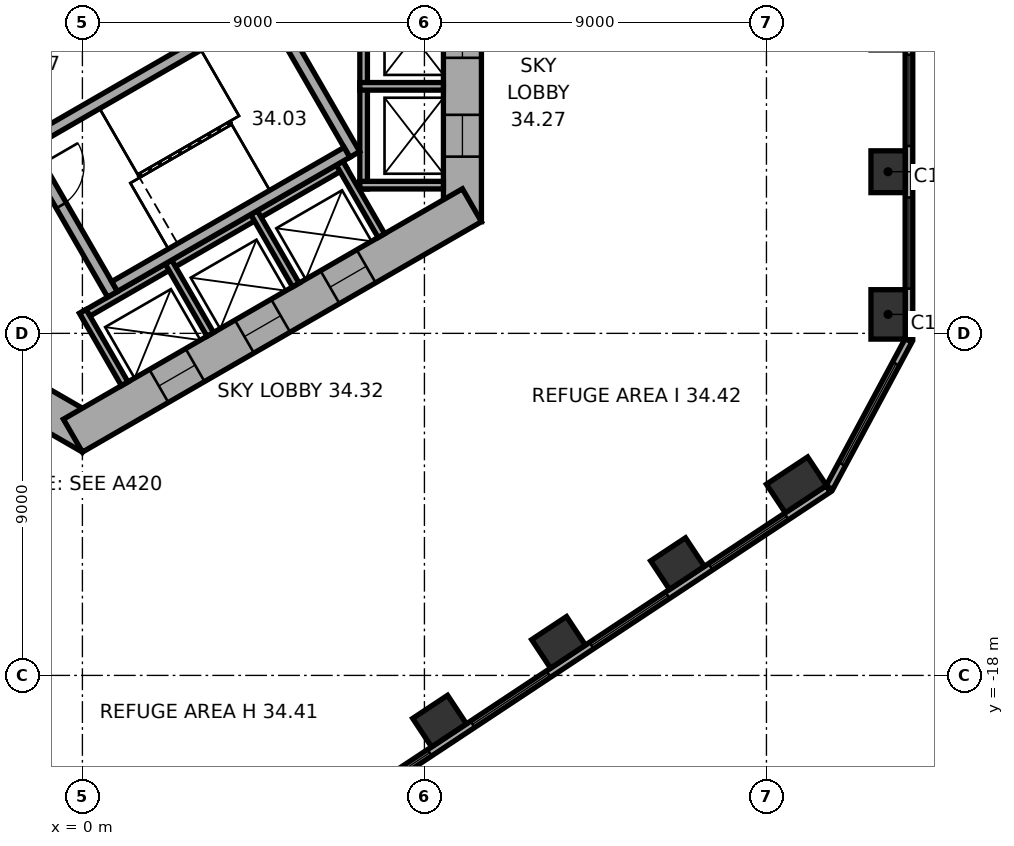
"""IFC4 building model, lengths in metres.
Left out: names, types, materials, properties, quantities, classifications, styles, units other than length and angle.
Written with IfcOpenShell. Run it as: python <this file> out.ifc"""

import sys

from ifc_helpers import new_model, si_unit, direction, frame, frame_2d, origin, origin_2d, place, context, subcontext, project, spatial, rectangle, extrude, element, fill, save


model = new_model("IFC4")
c1 = context("Model", 3, precision=1e-05, world=origin(), true_north=direction((0.0, 1.0)))
c2 = subcontext(c1, "Body", "Model", "MODEL_VIEW")
j1 = project(units=[si_unit("LENGTHUNIT", "METRE"), si_unit("PLANEANGLEUNIT", "RADIAN")], contexts=[c1])
p1 = place(None, origin())
s1 = spatial("IfcSite", under=j1, at=p1, CompositionType="ELEMENT")
p2 = place(p1, origin())
s2 = spatial("IfcBuilding", under=s1, at=p2, CompositionType="ELEMENT")
p3 = place(p2, frame((0.0, 0.0, 139.2)))
s3 = spatial("IfcBuildingStorey", under=s2, at=p3, CompositionType="ELEMENT", Elevation=139.2)
p4 = place(p3, frame((21.2, -8.501, 0.0), z_axis=(0.0, 0.0, 1.0), x_axis=(0.0, 1.0, 0.0)))
e1 = element("IfcColumn", 1, at=p4, inside=s3, PredefinedType="COLUMN", context=c2, shape_type="SweptSolid", body=[
    extrude(rectangle(XDim=1.3, YDim=0.9, at=origin_2d()), origin(), (0.0, 0.0, 1.0), 7.4),
])
for number, where, z_axis, x_axis in (
    (2, (21.2, -4.747, 0.0), (0.0, 0.0, 1.0), (0.0, 1.0, 0.0)),
    (3, (9.398, -19.202, 0.0), (0.0, 0.0, 1.0), (0.834, 0.552, 0.0)),
    (4, (12.529, -17.13, 0.0), (0.0, 0.0, 1.0), (0.834, 0.552, 0.0)),
    (5, (15.659, -15.058, 0.0), (0.0, 0.0, 1.0), (0.834, 0.552, 0.0)),
):
    element("IfcColumn", number, at=place(p3, frame(where, z_axis=z_axis, x_axis=x_axis)), inside=s3, PredefinedType="COLUMN", context=c2, shape_type="SweptSolid", body=[
        extrude(rectangle(XDim=1.1, YDim=0.9, at=origin_2d()), origin(), (0.0, 0.0, 1.0), 7.4),
    ])
p5 = place(p3, frame((18.79, -12.986, 0.0), z_axis=(0.0, 0.0, 1.0), x_axis=(0.833885822067, 0.551936985312, 0.0)))
e6 = element("IfcColumn", 6, at=p5, inside=s3, PredefinedType="COLUMN", context=c2, shape_type="SweptSolid", body=[
    extrude(rectangle(XDim=1.3, YDim=0.9, at=origin_2d()), origin(), (0.0, 0.0, 1.0), 7.4),
])
p6 = place(p3, frame((10.0, -6.062, 0.0), z_axis=(0.0, 0.0, 1.0), x_axis=(0.0, 1.0, 0.0)))
e7 = element("IfcWall", 7, at=p6, inside=s3, PredefinedType="SHEAR", context=c2, shape_type="SweptSolid", body=[
    extrude(rectangle(XDim=12.125, YDim=1.0, at=frame_2d((6.062, 0.0))), origin(), (0.0, 0.0, 1.0), 7.4),
])
p7 = place(p6, frame((6.262, 0.0, 0.0)))
e8 = element("IfcOpeningElement", 8, at=p7, cuts=e7, PredefinedType="OPENING", context=c2, shape_type="SweptSolid", body=[
    extrude(rectangle(XDim=1.5, YDim=2.1, at=frame_2d((0.75, 1.05))), frame((0.0, 0.51, 0.0), z_axis=(0.0, -1.0, 0.0), x_axis=(1.0, 0.0, 0.0)), (0.0, 0.0, 1.0), 1.02),
])
p8 = place(p6, frame((1.712, 0.0, 0.0)))
e9 = element("IfcOpeningElement", 9, at=p8, cuts=e7, PredefinedType="OPENING", context=c2, shape_type="SweptSolid", body=[
    extrude(rectangle(XDim=1.1, YDim=2.1, at=frame_2d((0.55, 1.05))), frame((0.0, 0.51, 0.0), z_axis=(0.0, -1.0, 0.0), x_axis=(1.0, 0.0, 0.0)), (0.0, 0.0, 1.0), 1.02),
])
p9 = place(p6, frame((4.312, 0.0, 0.0)))
e10 = element("IfcOpeningElement", 10, at=p9, cuts=e7, PredefinedType="OPENING", context=c2, shape_type="SweptSolid", body=[
    extrude(rectangle(XDim=1.1, YDim=2.1, at=frame_2d((0.55, 1.05))), frame((0.0, 0.51, 0.0), z_axis=(0.0, -1.0, 0.0), x_axis=(1.0, 0.0, 0.0)), (0.0, 0.0, 1.0), 1.02),
])
p10 = place(p3, frame((-10.25, -5.629, 0.0), z_axis=(0.0, 0.0, 1.0), x_axis=(0.866022616891, -0.50000482701, 0.0)))
e11 = element("IfcWall", 11, at=p10, inside=s3, PredefinedType="SHEAR", context=c2, shape_type="SweptSolid", body=[
    extrude(rectangle(XDim=12.125, YDim=1.0, at=frame_2d((6.062, 0.0))), origin(), (0.0, 0.0, 1.0), 7.4),
])
p11 = place(p10, frame((6.262, 0.0, 0.0)))
e12 = element("IfcOpeningElement", 12, at=p11, cuts=e11, PredefinedType="OPENING", context=c2, shape_type="SweptSolid", body=[
    extrude(rectangle(XDim=1.5, YDim=2.1, at=frame_2d((0.75, 1.05))), frame((0.0, 0.51, 0.0), z_axis=(0.0, -1.0, 0.0), x_axis=(1.0, 0.0, 0.0)), (0.0, 0.0, 1.0), 1.02),
])
p12 = place(p10, frame((1.712, 0.0, 0.0)))
e13 = element("IfcOpeningElement", 13, at=p12, cuts=e11, PredefinedType="OPENING", context=c2, shape_type="SweptSolid", body=[
    extrude(rectangle(XDim=1.1, YDim=2.1, at=frame_2d((0.55, 1.05))), frame((0.0, 0.51, 0.0), z_axis=(0.0, -1.0, 0.0), x_axis=(1.0, 0.0, 0.0)), (0.0, 0.0, 1.0), 1.02),
])
p13 = place(p10, frame((4.312, 0.0, 0.0)))
e14 = element("IfcOpeningElement", 14, at=p13, cuts=e11, PredefinedType="OPENING", context=c2, shape_type="SweptSolid", body=[
    extrude(rectangle(XDim=1.1, YDim=2.1, at=frame_2d((0.55, 1.05))), frame((0.0, 0.51, 0.0), z_axis=(0.0, -1.0, 0.0), x_axis=(1.0, 0.0, 0.0)), (0.0, 0.0, 1.0), 1.02),
])
p14 = place(p3, frame((-0.25, -11.691, 0.0), z_axis=(0.0, 0.0, 1.0), x_axis=(0.866022616891, 0.50000482701, 0.0)))
e15 = element("IfcWall", 15, at=p14, inside=s3, PredefinedType="SHEAR", context=c2, shape_type="SweptSolid", body=[
    extrude(rectangle(XDim=12.125, YDim=1.0, at=frame_2d((6.062, 0.0))), origin(), (0.0, 0.0, 1.0), 7.4),
])
p15 = place(p14, frame((2.612, 0.0, 0.0)))
e16 = element("IfcOpeningElement", 16, at=p15, cuts=e15, PredefinedType="OPENING", context=c2, shape_type="SweptSolid", body=[
    extrude(rectangle(XDim=1.1, YDim=2.1, at=frame_2d((0.55, 1.05))), frame((0.0, 0.51, 0.0), z_axis=(0.0, -1.0, 0.0), x_axis=(1.0, 0.0, 0.0)), (0.0, 0.0, 1.0), 1.02),
])
p16 = place(p14, frame((5.212, 0.0, 0.0)))
e17 = element("IfcOpeningElement", 17, at=p16, cuts=e15, PredefinedType="OPENING", context=c2, shape_type="SweptSolid", body=[
    extrude(rectangle(XDim=1.1, YDim=2.1, at=frame_2d((0.55, 1.05))), frame((0.0, 0.51, 0.0), z_axis=(0.0, -1.0, 0.0), x_axis=(1.0, 0.0, 0.0)), (0.0, 0.0, 1.0), 1.02),
])
p17 = place(p14, frame((7.812, 0.0, 0.0)))
e18 = element("IfcOpeningElement", 18, at=p17, cuts=e15, PredefinedType="OPENING", context=c2, shape_type="SweptSolid", body=[
    extrude(rectangle(XDim=1.1, YDim=2.1, at=frame_2d((0.55, 1.05))), frame((0.0, 0.51, 0.0), z_axis=(0.0, -1.0, 0.0), x_axis=(1.0, 0.0, 0.0)), (0.0, 0.0, 1.0), 1.02),
])
p18 = place(p3, frame((21.75, -9.138, 0.0), z_axis=(0.0, 0.0, 1.0), x_axis=(0.0, 1.0, 0.0)))
e19 = element("IfcWall", 19, at=p18, inside=s3, PredefinedType="STANDARD", context=c2, shape_type="SweptSolid", body=[
    extrude(rectangle(XDim=20.044, YDim=0.2, at=frame_2d((10.022, 0.0))), origin(), (0.0, 0.0, 1.0), 7.4),
])
p19 = place(p18, frame((1.314, 0.0, 0.8)))
e20 = element("IfcOpeningElement", 20, at=p19, cuts=e19, PredefinedType="OPENING", context=c2, shape_type="SweptSolid", body=[
    extrude(rectangle(XDim=2.4, YDim=4.2, at=frame_2d((1.2, 2.1))), frame((0.0, 0.11, 0.0), z_axis=(0.0, -1.0, 0.0), x_axis=(1.0, 0.0, 0.0)), (0.0, 0.0, 1.0), 0.22),
])
p20 = place(p18, frame((5.069, 0.0, 0.8)))
e21 = element("IfcOpeningElement", 21, at=p20, cuts=e19, PredefinedType="OPENING", context=c2, shape_type="SweptSolid", body=[
    extrude(rectangle(XDim=2.4, YDim=4.2, at=frame_2d((1.2, 2.1))), frame((0.0, 0.11, 0.0), z_axis=(0.0, -1.0, 0.0), x_axis=(1.0, 0.0, 0.0)), (0.0, 0.0, 1.0), 0.22),
])
p21 = place(p18, frame((8.823, 0.0, 0.8)))
e22 = element("IfcOpeningElement", 22, at=p21, cuts=e19, PredefinedType="OPENING", context=c2, shape_type="SweptSolid", body=[
    extrude(rectangle(XDim=2.4, YDim=4.2, at=frame_2d((1.2, 2.1))), frame((0.0, 0.11, 0.0), z_axis=(0.0, -1.0, 0.0), x_axis=(1.0, 0.0, 0.0)), (0.0, 0.0, 1.0), 0.22),
])
p22 = place(p18, frame((12.577, 0.0, 0.8)))
e23 = element("IfcOpeningElement", 23, at=p22, cuts=e19, PredefinedType="OPENING", context=c2, shape_type="SweptSolid", body=[
    extrude(rectangle(XDim=2.4, YDim=4.2, at=frame_2d((1.2, 2.1))), frame((0.0, 0.11, 0.0), z_axis=(0.0, -1.0, 0.0), x_axis=(1.0, 0.0, 0.0)), (0.0, 0.0, 1.0), 0.22),
])
p23 = place(p18, frame((16.331, 0.0, 0.8)))
e24 = element("IfcOpeningElement", 24, at=p23, cuts=e19, PredefinedType="OPENING", context=c2, shape_type="SweptSolid", body=[
    extrude(rectangle(XDim=2.4, YDim=4.2, at=frame_2d((1.2, 2.1))), frame((0.0, 0.11, 0.0), z_axis=(0.0, -1.0, 0.0), x_axis=(1.0, 0.0, 0.0)), (0.0, 0.0, 1.0), 0.22),
])
p24 = place(p3, frame((2.911, -24.156, 0.0), z_axis=(0.0, 0.0, 1.0), x_axis=(0.833882163564, 0.551942512668, 0.0)))
e25 = element("IfcWall", 25, at=p24, inside=s3, PredefinedType="STANDARD", context=c2, shape_type="SweptSolid", body=[
    extrude(rectangle(XDim=20.044, YDim=0.2, at=frame_2d((10.022, 0.0))), origin(), (0.0, 0.0, 1.0), 7.4),
])
p25 = place(p24, frame((1.313, 0.0, 0.8)))
e26 = element("IfcOpeningElement", 26, at=p25, cuts=e25, PredefinedType="OPENING", context=c2, shape_type="SweptSolid", body=[
    extrude(rectangle(XDim=2.4, YDim=4.2, at=frame_2d((1.2, 2.1))), frame((0.0, 0.11, 0.0), z_axis=(0.0, -1.0, 0.0), x_axis=(1.0, 0.0, 0.0)), (0.0, 0.0, 1.0), 0.22),
])
p26 = place(p24, frame((5.067, 0.0, 0.8)))
e27 = element("IfcOpeningElement", 27, at=p26, cuts=e25, PredefinedType="OPENING", context=c2, shape_type="SweptSolid", body=[
    extrude(rectangle(XDim=2.4, YDim=4.2, at=frame_2d((1.2, 2.1))), frame((0.0, 0.11, 0.0), z_axis=(0.0, -1.0, 0.0), x_axis=(1.0, 0.0, 0.0)), (0.0, 0.0, 1.0), 0.22),
])
p27 = place(p24, frame((8.821, 0.0, 0.8)))
e28 = element("IfcOpeningElement", 28, at=p27, cuts=e25, PredefinedType="OPENING", context=c2, shape_type="SweptSolid", body=[
    extrude(rectangle(XDim=2.4, YDim=4.2, at=frame_2d((1.2, 2.1))), frame((0.0, 0.11, 0.0), z_axis=(0.0, -1.0, 0.0), x_axis=(1.0, 0.0, 0.0)), (0.0, 0.0, 1.0), 0.22),
])
p28 = place(p24, frame((12.575, 0.0, 0.8)))
e29 = element("IfcOpeningElement", 29, at=p28, cuts=e25, PredefinedType="OPENING", context=c2, shape_type="SweptSolid", body=[
    extrude(rectangle(XDim=2.4, YDim=4.2, at=frame_2d((1.2, 2.1))), frame((0.0, 0.11, 0.0), z_axis=(0.0, -1.0, 0.0), x_axis=(1.0, 0.0, 0.0)), (0.0, 0.0, 1.0), 0.22),
])
p29 = place(p24, frame((16.329, 0.0, 0.8)))
e30 = element("IfcOpeningElement", 30, at=p29, cuts=e25, PredefinedType="OPENING", context=c2, shape_type="SweptSolid", body=[
    extrude(rectangle(XDim=2.4, YDim=4.2, at=frame_2d((1.2, 2.1))), frame((0.0, 0.11, 0.0), z_axis=(0.0, -1.0, 0.0), x_axis=(1.0, 0.0, 0.0)), (0.0, 0.0, 1.0), 0.22),
])
p30 = place(p3, frame((19.658, -13.057, 0.0), z_axis=(0.0, 0.0, 1.0), x_axis=(0.473307879841, 0.880897071672, 0.0)))
e31 = element("IfcWall", 31, at=p30, inside=s3, PredefinedType="STANDARD", context=c2, shape_type="SweptSolid", body=[
    extrude(rectangle(XDim=4.395, YDim=0.2, at=frame_2d((2.197, 0.0))), origin(), (0.0, 0.0, 1.0), 7.4),
])
p31 = place(p30, frame((0.698, 0.0, 0.8)))
e32 = element("IfcOpeningElement", 32, at=p31, cuts=e31, PredefinedType="OPENING", context=c2, shape_type="SweptSolid", body=[
    extrude(rectangle(XDim=3.0, YDim=4.2, at=frame_2d((1.5, 2.1))), frame((0.0, 0.11, 0.0), z_axis=(0.0, -1.0, 0.0), x_axis=(1.0, 0.0, 0.0)), (0.0, 0.0, 1.0), 0.22),
])
p32 = place(p3, frame((7.4, -5.2, 0.0), z_axis=(0.0, 0.0, 1.0), x_axis=(0.0, 1.0, 0.0)))
e33 = element("IfcWall", 33, at=p32, inside=s3, PredefinedType="PARTITIONING", context=c2, shape_type="SweptSolid", body=[
    extrude(rectangle(XDim=5.4, YDim=0.2, at=frame_2d((2.7, 0.0))), origin(), (0.0, 0.0, 1.0), 7.12),
])
for number, where, z_axis, x_axis in (
    (34, (7.3, -5.1, 0.0), (0.0, 0.0, 1.0), (1.0, 0.0, 0.0)),
    (35, (7.3, -2.5, 0.0), (0.0, 0.0, 1.0), (1.0, 0.0, 0.0)),
):
    element("IfcWall", number, at=place(p3, frame(where, z_axis=z_axis, x_axis=x_axis)), inside=s3, PredefinedType="PARTITIONING", context=c2, shape_type="SweptSolid", body=[
        extrude(rectangle(XDim=2.2, YDim=0.2, at=frame_2d((1.1, 0.0))), origin(), (0.0, 0.0, 1.0), 7.12),
    ])
p33 = place(p3, frame((-0.024, -8.559, 0.0), z_axis=(0.0, 0.0, 1.0), x_axis=(0.866026010844, 0.49999894854, 0.0)))
e36 = element("IfcWall", 36, at=p33, inside=s3, PredefinedType="PARTITIONING", context=c2, shape_type="SweptSolid", body=[
    extrude(rectangle(XDim=8.0, YDim=0.2, at=frame_2d((4.0, 0.0))), origin(), (0.0, 0.0, 1.0), 7.12),
])
for number, where, z_axis, x_axis in (
    (37, (0.013, -8.422, 0.0), (0.0, 0.0, 1.0), (0.5, -0.866, 0.0)),
    (38, (2.264, -7.122, 0.0), (0.0, 0.0, 1.0), (0.5, -0.866, 0.0)),
    (39, (4.516, -5.822, 0.0), (0.0, 0.0, 1.0), (0.5, -0.866, 0.0)),
    (40, (6.768, -4.522, 0.0), (0.0, 0.0, 1.0), (0.5, -0.866, 0.0)),
):
    element("IfcWall", number, at=place(p3, frame(where, z_axis=z_axis, x_axis=x_axis)), inside=s3, PredefinedType="PARTITIONING", context=c2, shape_type="SweptSolid", body=[
        extrude(rectangle(XDim=2.2, YDim=0.2, at=frame_2d((1.1, 0.0))), origin(), (0.0, 0.0, 1.0), 7.12),
    ])
p34 = place(p3, frame((-1.558, -3.902, 0.0), z_axis=(0.0, 0.0, 1.0), x_axis=(0.499977259774, -0.866038532462, 0.0)))
e41 = element("IfcWall", 41, at=p34, inside=s3, PredefinedType="SHEAR", context=c2, shape_type="SweptSolid", body=[
    extrude(rectangle(XDim=4.7, YDim=0.3, at=frame_2d((2.35, 0.0))), origin(), (0.0, 0.0, 1.0), 7.12),
])
p35 = place(p34, frame((0.8, 0.0, 0.0)))
e42 = element("IfcOpeningElement", 42, at=p35, cuts=e41, PredefinedType="OPENING", context=c2, shape_type="SweptSolid", body=[
    extrude(rectangle(XDim=1.2, YDim=2.1, at=frame_2d((0.6, 1.05))), frame((0.0, 0.16, 0.0), z_axis=(0.0, -1.0, 0.0), x_axis=(1.0, 0.0, 0.0)), (0.0, 0.0, 1.0), 0.32),
])
p36 = place(p3, frame((4.816, -0.222, 0.0), z_axis=(0.0, 0.0, 1.0), x_axis=(0.499977259774, -0.866038532462, 0.0)))
e43 = element("IfcWall", 43, at=p36, inside=s3, PredefinedType="SHEAR", context=c2, shape_type="SweptSolid", body=[
    extrude(rectangle(XDim=4.7, YDim=0.3, at=frame_2d((2.35, 0.0))), origin(), (0.0, 0.0, 1.0), 7.12),
])
for number, where, z_axis, x_axis in (
    (44, (-1.353, -3.957, 0.0), (0.0, 0.0, 1.0), (0.866, 0.5, 0.0)),
    (45, (0.847, -7.767, 0.0), (0.0, 0.0, 1.0), (0.866, 0.5, 0.0)),
):
    element("IfcWall", number, at=place(p3, frame(where, z_axis=z_axis, x_axis=x_axis)), inside=s3, PredefinedType="SHEAR", context=c2, shape_type="SweptSolid", body=[
        extrude(rectangle(XDim=7.06, YDim=0.3, at=frame_2d((3.53, 0.0))), origin(), (0.0, 0.0, 1.0), 7.12),
    ])
p37 = place(p19, origin())
e46 = element("IfcWindow", 46, at=p37, inside=s3, PartitioningType="SINGLE_PANEL", PredefinedType="WINDOW", context=c2, shape_type="SweptSolid", body=[
    extrude(rectangle(XDim=2.4, YDim=4.2, at=frame_2d((1.2, 2.1))), frame((0.0, 0.03, 0.0), z_axis=(0.0, -1.0, 0.0), x_axis=(1.0, 0.0, 0.0)), (0.0, 0.0, 1.0), 0.06),
])
fill(e20, e46)
p38 = place(p20, origin())
e47 = element("IfcWindow", 47, at=p38, inside=s3, PartitioningType="SINGLE_PANEL", PredefinedType="WINDOW", context=c2, shape_type="SweptSolid", body=[
    extrude(rectangle(XDim=2.4, YDim=4.2, at=frame_2d((1.2, 2.1))), frame((0.0, 0.03, 0.0), z_axis=(0.0, -1.0, 0.0), x_axis=(1.0, 0.0, 0.0)), (0.0, 0.0, 1.0), 0.06),
])
fill(e21, e47)
p39 = place(p26, origin())
e48 = element("IfcWindow", 48, at=p39, inside=s3, PartitioningType="SINGLE_PANEL", PredefinedType="WINDOW", context=c2, shape_type="SweptSolid", body=[
    extrude(rectangle(XDim=2.4, YDim=4.2, at=frame_2d((1.2, 2.1))), frame((0.0, 0.03, 0.0), z_axis=(0.0, -1.0, 0.0), x_axis=(1.0, 0.0, 0.0)), (0.0, 0.0, 1.0), 0.06),
])
fill(e27, e48)
p40 = place(p27, origin())
e49 = element("IfcWindow", 49, at=p40, inside=s3, PartitioningType="SINGLE_PANEL", PredefinedType="WINDOW", context=c2, shape_type="SweptSolid", body=[
    extrude(rectangle(XDim=2.4, YDim=4.2, at=frame_2d((1.2, 2.1))), frame((0.0, 0.03, 0.0), z_axis=(0.0, -1.0, 0.0), x_axis=(1.0, 0.0, 0.0)), (0.0, 0.0, 1.0), 0.06),
])
fill(e28, e49)
p41 = place(p28, origin())
e50 = element("IfcWindow", 50, at=p41, inside=s3, PartitioningType="SINGLE_PANEL", PredefinedType="WINDOW", context=c2, shape_type="SweptSolid", body=[
    extrude(rectangle(XDim=2.4, YDim=4.2, at=frame_2d((1.2, 2.1))), frame((0.0, 0.03, 0.0), z_axis=(0.0, -1.0, 0.0), x_axis=(1.0, 0.0, 0.0)), (0.0, 0.0, 1.0), 0.06),
])
fill(e29, e50)
p42 = place(p29, origin())
e51 = element("IfcWindow", 51, at=p42, inside=s3, PartitioningType="SINGLE_PANEL", PredefinedType="WINDOW", context=c2, shape_type="SweptSolid", body=[
    extrude(rectangle(XDim=2.4, YDim=4.2, at=frame_2d((1.2, 2.1))), frame((0.0, 0.03, 0.0), z_axis=(0.0, -1.0, 0.0), x_axis=(1.0, 0.0, 0.0)), (0.0, 0.0, 1.0), 0.06),
])
fill(e30, e51)
p43 = place(p31, origin())
e52 = element("IfcWindow", 52, at=p43, inside=s3, PartitioningType="SINGLE_PANEL", PredefinedType="WINDOW", context=c2, shape_type="SweptSolid", body=[
    extrude(rectangle(XDim=3.0, YDim=4.2, at=frame_2d((1.5, 2.1))), frame((0.0, 0.03, 0.0), z_axis=(0.0, -1.0, 0.0), x_axis=(1.0, 0.0, 0.0)), (0.0, 0.0, 1.0), 0.06),
])
fill(e32, e52)
p44 = place(p35, origin())
e53 = element("IfcDoor", 53, at=p44, inside=s3, OperationType="SINGLE_SWING_RIGHT", PredefinedType="DOOR", context=c2, shape_type="SweptSolid", body=[
    extrude(rectangle(XDim=1.2, YDim=2.1, at=frame_2d((0.6, 1.05))), frame((0.0, 0.025, 0.0), z_axis=(0.0, -1.0, 0.0), x_axis=(1.0, 0.0, 0.0)), (0.0, 0.0, 1.0), 0.05),
])
fill(e42, e53)
p45 = place(p15, origin())
e54 = element("IfcDoor", 54, at=p45, inside=s3, OperationType="DOUBLE_DOOR_SLIDING", PredefinedType="DOOR", context=c2, shape_type="SweptSolid", body=[
    extrude(rectangle(XDim=1.1, YDim=2.1, at=frame_2d((0.55, 1.05))), frame((0.0, 0.025, 0.0), z_axis=(0.0, -1.0, 0.0), x_axis=(1.0, 0.0, 0.0)), (0.0, 0.0, 1.0), 0.05),
])
fill(e16, e54)
p46 = place(p16, origin())
e55 = element("IfcDoor", 55, at=p46, inside=s3, OperationType="DOUBLE_DOOR_SLIDING", PredefinedType="DOOR", context=c2, shape_type="SweptSolid", body=[
    extrude(rectangle(XDim=1.1, YDim=2.1, at=frame_2d((0.55, 1.05))), frame((0.0, 0.025, 0.0), z_axis=(0.0, -1.0, 0.0), x_axis=(1.0, 0.0, 0.0)), (0.0, 0.0, 1.0), 0.05),
])
fill(e17, e55)
p47 = place(p8, origin())
e56 = element("IfcDoor", 56, at=p47, inside=s3, OperationType="DOUBLE_DOOR_SLIDING", PredefinedType="DOOR", context=c2, shape_type="SweptSolid", body=[
    extrude(rectangle(XDim=1.1, YDim=2.1, at=frame_2d((0.55, 1.05))), frame((0.0, 0.025, 0.0), z_axis=(0.0, -1.0, 0.0), x_axis=(1.0, 0.0, 0.0)), (0.0, 0.0, 1.0), 0.05),
])
fill(e9, e56)
p48 = place(p9, origin())
e57 = element("IfcDoor", 57, at=p48, inside=s3, OperationType="DOUBLE_DOOR_SLIDING", PredefinedType="DOOR", context=c2, shape_type="SweptSolid", body=[
    extrude(rectangle(XDim=1.1, YDim=2.1, at=frame_2d((0.55, 1.05))), frame((0.0, 0.025, 0.0), z_axis=(0.0, -1.0, 0.0), x_axis=(1.0, 0.0, 0.0)), (0.0, 0.0, 1.0), 0.05),
])
fill(e10, e57)
p49 = place(p17, origin())
e58 = element("IfcDoor", 58, at=p49, inside=s3, OperationType="DOUBLE_DOOR_SLIDING", PredefinedType="DOOR", context=c2, shape_type="SweptSolid", body=[
    extrude(rectangle(XDim=1.1, YDim=2.1, at=frame_2d((0.55, 1.05))), frame((0.0, 0.025, 0.0), z_axis=(0.0, -1.0, 0.0), x_axis=(1.0, 0.0, 0.0)), (0.0, 0.0, 1.0), 0.05),
])
fill(e18, e58)
save(model, sys.argv[1])
